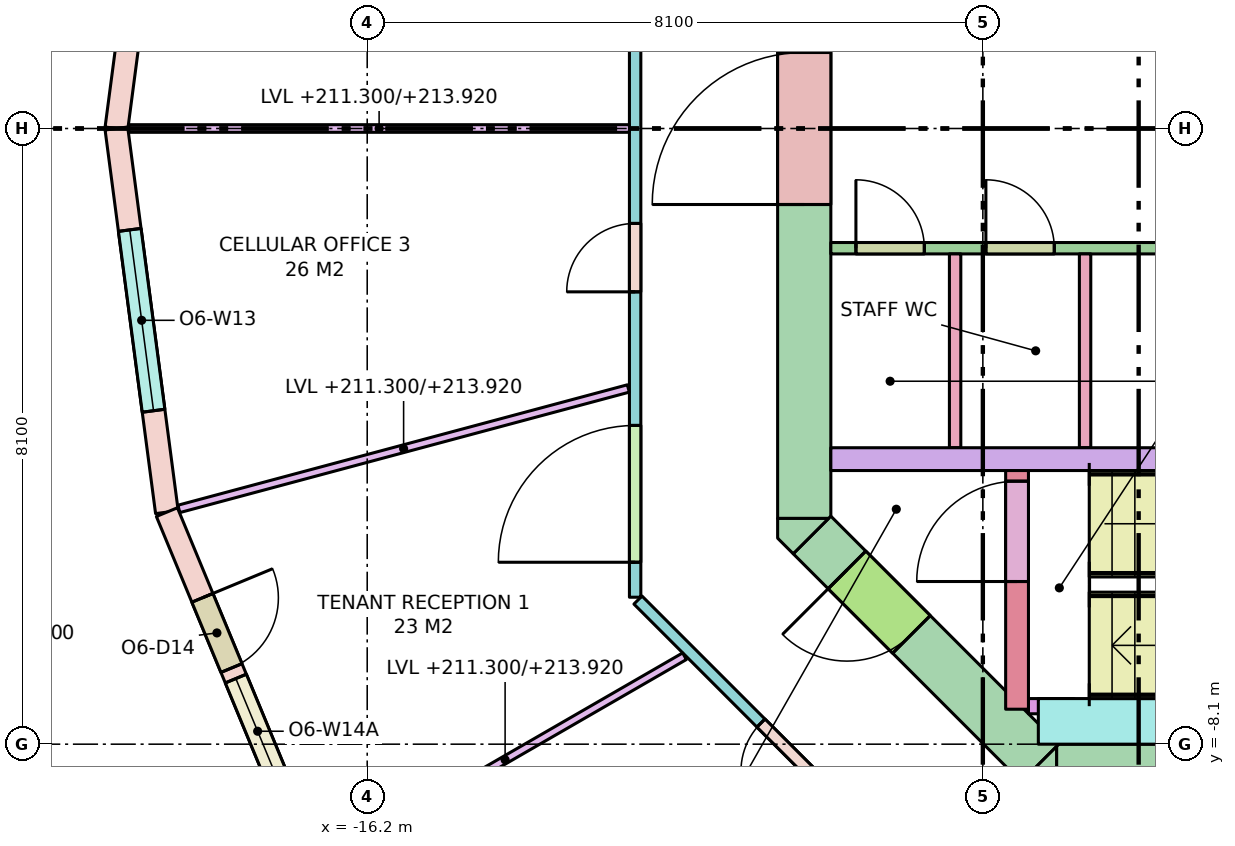
"""IFC4 building model, lengths in metres.
Left out: names, types, materials, properties, quantities, classifications, styles, units other than length and angle.
Written with IfcOpenShell. Run it as: python <this file> out.ifc"""

import sys

from ifc_helpers import new_model, si_unit, direction, frame, frame_2d, origin, place, context, subcontext, project, spatial, polyline, rectangle, outline, extrude, element, fill, save


model = new_model("IFC4")
c1 = context("Model", 3, precision=1e-05, world=origin(), true_north=direction((0.0, 1.0)))
c2 = subcontext(c1, "Body", "Model", "MODEL_VIEW")
j1 = project(units=[si_unit("LENGTHUNIT", "METRE"), si_unit("PLANEANGLEUNIT", "RADIAN")], contexts=[c1])
p1 = place(None, origin())
s1 = spatial("IfcSite", under=j1, at=p1, CompositionType="ELEMENT")
p2 = place(p1, origin())
s2 = spatial("IfcBuilding", under=s1, at=p2, CompositionType="ELEMENT")
p3 = place(p2, frame((0.0, 0.0, 211.3)))
s3 = spatial("IfcBuildingStorey", under=s2, at=p3, CompositionType="ELEMENT", Elevation=211.3)
p4 = place(p3, frame((-7.13, -8.45, -0.28), z_axis=(0.0, 0.0, 1.0), x_axis=(1.0, 0.0, 0.0)))
e1 = element("IfcWall", 1, at=p4, inside=s3, PredefinedType="SHEAR", context=c2, shape_type="SweptSolid", body=[
    extrude(rectangle(XDim=14.26, YDim=0.7, at=frame_2d((7.13, 0.0))), origin(), (0.0, 0.0, 1.0), 3.7),
])
p5 = place(p4, frame((8.08, 0.0, 0.28)))
e2 = element("IfcOpeningElement", 2, at=p5, cuts=e1, PredefinedType="OPENING", context=c2, shape_type="SweptSolid", body=[
    extrude(rectangle(XDim=0.7, YDim=2.1, at=frame_2d((0.35, 1.05))), frame((0.0, 0.36, 0.0), z_axis=(0.0, -1.0, 0.0), x_axis=(1.0, 0.0, 0.0)), (0.0, 0.0, 1.0), 0.72),
])
p6 = place(p4, frame((5.58, 0.0, 0.28)))
e3 = element("IfcOpeningElement", 3, at=p6, cuts=e1, PredefinedType="OPENING", context=c2, shape_type="SweptSolid", body=[
    extrude(rectangle(XDim=0.85, YDim=2.1, at=frame_2d((0.425, 1.05))), frame((0.0, 0.36, 0.0), z_axis=(0.0, -1.0, 0.0), x_axis=(1.0, 0.0, 0.0)), (0.0, 0.0, 1.0), 0.72),
])
p7 = place(p4, frame((6.88, 0.0, 0.28)))
e4 = element("IfcOpeningElement", 4, at=p7, cuts=e1, PredefinedType="OPENING", context=c2, shape_type="SweptSolid", body=[
    extrude(rectangle(XDim=0.85, YDim=2.1, at=frame_2d((0.425, 1.05))), frame((0.0, 0.36, 0.0), z_axis=(0.0, -1.0, 0.0), x_axis=(1.0, 0.0, 0.0)), (0.0, 0.0, 1.0), 0.72),
])
p8 = place(p4, frame((9.521, 0.0, 0.28)))
e5 = element("IfcOpeningElement", 5, at=p8, cuts=e1, PredefinedType="OPENING", context=c2, shape_type="SweptSolid", body=[
    extrude(rectangle(XDim=0.9, YDim=2.1, at=frame_2d((0.45, 1.05))), frame((0.0, 0.36, 0.0), z_axis=(0.0, -1.0, 0.0), x_axis=(1.0, 0.0, 0.0)), (0.0, 0.0, 1.0), 0.72),
])
p9 = place(p4, frame((11.278, 0.0, 0.28)))
e6 = element("IfcOpeningElement", 6, at=p9, cuts=e1, PredefinedType="OPENING", context=c2, shape_type="SweptSolid", body=[
    extrude(rectangle(XDim=0.9, YDim=2.1, at=frame_2d((0.45, 1.05))), frame((0.0, 0.36, 0.0), z_axis=(0.0, -1.0, 0.0), x_axis=(1.0, 0.0, 0.0)), (0.0, 0.0, 1.0), 0.72),
])
p10 = place(p4, frame((12.84, 0.0, 0.28)))
e7 = element("IfcOpeningElement", 7, at=p10, cuts=e1, PredefinedType="OPENING", context=c2, shape_type="SweptSolid", body=[
    extrude(rectangle(XDim=0.9, YDim=2.1, at=frame_2d((0.45, 1.05))), frame((0.0, 0.36, 0.0), z_axis=(0.0, -1.0, 0.0), x_axis=(1.0, 0.0, 0.0)), (0.0, 0.0, 1.0), 0.72),
])
p11 = place(p3, frame((-10.45, -5.13, -0.28), z_axis=(0.0, 0.0, 1.0), x_axis=(0.0, 1.0, 0.0)))
e8 = element("IfcWall", 8, at=p11, inside=s3, PredefinedType="SHEAR", context=c2, shape_type="SweptSolid", body=[
    extrude(rectangle(XDim=10.26, YDim=0.7, at=frame_2d((5.13, 0.0))), origin(), (0.0, 0.0, 1.0), 3.7),
])
p12 = place(p11, frame((4.13, 0.0, 0.28)))
e9 = element("IfcOpeningElement", 9, at=p12, cuts=e8, PredefinedType="OPENING", context=c2, shape_type="SweptSolid", body=[
    extrude(rectangle(XDim=2.0, YDim=2.1, at=frame_2d((1.0, 1.05))), frame((0.0, 0.36, 0.0), z_axis=(0.0, -1.0, 0.0), x_axis=(1.0, 0.0, 0.0)), (0.0, 0.0, 1.0), 0.72),
])
p13 = place(p3, frame((-7.347, -8.347, -0.28), z_axis=(0.0, 0.0, 1.0), x_axis=(-0.707106781187, 0.707106781187, 0.0)))
e10 = element("IfcWall", 10, at=p13, inside=s3, PredefinedType="SHEAR", context=c2, shape_type="SweptSolid", body=[
    extrude(rectangle(XDim=4.243, YDim=0.7, at=frame_2d((2.121, 0.0))), origin(), (0.0, 0.0, 1.0), 3.7),
])
p14 = place(p13, frame((2.393, 0.0, 0.28)))
e11 = element("IfcOpeningElement", 11, at=p14, cuts=e10, PredefinedType="OPENING", context=c2, shape_type="SweptSolid", body=[
    extrude(rectangle(XDim=1.2, YDim=2.1, at=frame_2d((0.6, 1.05))), frame((0.0, 0.36, 0.0), z_axis=(0.0, -1.0, 0.0), x_axis=(1.0, 0.0, 0.0)), (0.0, 0.0, 1.0), 0.72),
])
p15 = place(p3, frame((0.0, 0.0, -0.28)))
e12 = element("IfcWall", 12, at=p15, inside=s3, PredefinedType="SHEAR", context=c2, shape_type="SweptSolid", body=[
    extrude(outline(polyline([(-7.39, -8.8), (-7.595, -8.595), (-7.595, -8.595), (-7.595, -8.595), (-7.13, -8.13), (-7.13, -8.8), (-7.13, -8.8), (-7.39, -8.8)])), origin(), (0.0, 0.0, 1.0), 3.7),
])
p16 = place(p3, frame((0.0, 0.0, -0.28)))
e13 = element("IfcWall", 13, at=p16, inside=s3, PredefinedType="SHEAR", context=c2, shape_type="SweptSolid", body=[
    extrude(outline(polyline([(-10.8, -5.39), (-10.8, -5.13), (-10.8, -5.13), (-10.13, -5.13), (-10.595, -5.595), (-10.595, -5.595), (-10.595, -5.595), (-10.8, -5.39)])), origin(), (0.0, 0.0, 1.0), 3.7),
])
p17 = place(p3, frame((-10.1, -4.35, 0.0), z_axis=(0.0, 0.0, 1.0), x_axis=(1.0, 0.0, 0.0)))
e14 = element("IfcWall", 14, at=p17, inside=s3, PredefinedType="SOLIDWALL", context=c2, shape_type="SweptSolid", body=[
    extrude(rectangle(XDim=8.1, YDim=0.3, at=frame_2d((4.05, 0.0))), origin(), (0.0, 0.0, 1.0), 3.42),
])
p18 = place(p3, frame((-7.65, -7.64, 0.0), z_axis=(0.0, 0.0, 1.0), x_axis=(0.0, 1.0, 0.0)))
e15 = element("IfcWall", 15, at=p18, inside=s3, PredefinedType="SHEAR", context=c2, shape_type="SweptSolid", body=[
    extrude(rectangle(XDim=3.14, YDim=0.3, at=frame_2d((1.57, 0.0))), origin(), (0.0, 0.0, 1.0), 3.42),
])
p19 = place(p18, frame((1.68, 0.0, 0.0)))
e16 = element("IfcOpeningElement", 16, at=p19, cuts=e15, PredefinedType="OPENING", context=c2, shape_type="SweptSolid", body=[
    extrude(rectangle(XDim=1.32, YDim=2.1, at=frame_2d((0.66, 1.05))), frame((0.0, 0.16, 0.0), z_axis=(0.0, -1.0, 0.0), x_axis=(1.0, 0.0, 0.0)), (0.0, 0.0, 1.0), 0.32),
])
p20 = place(p3, frame((-7.5, -7.6, 0.0), z_axis=(0.0, 0.0, 1.0), x_axis=(1.0, 0.0, 0.0)))
e17 = element("IfcWall", 17, at=p20, inside=s3, PredefinedType="SHEAR", context=c2, shape_type="SweptSolid", body=[
    extrude(rectangle(XDim=0.6, YDim=0.2, at=frame_2d((0.3, 0.0))), origin(), (0.0, 0.0, 1.0), 3.42),
])
p21 = place(p3, frame((-7.37, -7.8, 0.0), z_axis=(0.0, 0.0, 1.0), x_axis=(1.0, 0.0, 0.0)))
e18 = element("IfcWall", 18, at=p21, inside=s3, PredefinedType="SHEAR", context=c2, shape_type="SweptSolid", body=[
    extrude(rectangle(XDim=5.37, YDim=0.6, at=frame_2d((2.685, 0.0))), origin(), (0.0, 0.0, 1.0), 3.42),
])
p22 = place(p3, frame((-18.836, 5.047, 0.0), z_axis=(0.0, 0.0, 1.0), x_axis=(-0.130495451964, -0.99144890792, 0.0)))
e19 = element("IfcWall", 19, at=p22, inside=s3, PredefinedType="STANDARD", context=c2, shape_type="SweptSolid", body=[
    extrude(rectangle(XDim=5.091, YDim=0.3, at=frame_2d((2.545, 0.0))), origin(), (0.0, 0.0, 1.0), 3.42),
])
p23 = place(p22, frame((1.22, 0.0, 0.0)))
e20 = element("IfcOpeningElement", 20, at=p23, cuts=e19, PredefinedType="OPENING", context=c2, shape_type="SweptSolid", body=[
    extrude(rectangle(XDim=1.0, YDim=2.4, at=frame_2d((0.5, 1.2))), frame((0.0, 0.16, 0.0), z_axis=(0.0, -1.0, 0.0), x_axis=(1.0, 0.0, 0.0)), (0.0, 0.0, 1.0), 0.32),
])
p24 = place(p22, frame((2.37, 0.0, 0.8)))
e21 = element("IfcOpeningElement", 21, at=p24, cuts=e19, PredefinedType="OPENING", context=c2, shape_type="SweptSolid", body=[
    extrude(rectangle(XDim=1.5, YDim=2.4, at=frame_2d((0.75, 1.2))), frame((0.0, 0.16, 0.0), z_axis=(0.0, -1.0, 0.0), x_axis=(1.0, 0.0, 0.0)), (0.0, 0.0, 1.0), 0.32),
])
p25 = place(p3, frame((-19.5, 0.0, 0.0), z_axis=(0.0, 0.0, 1.0), x_axis=(0.130495451964, -0.99144890792, 0.0)))
e22 = element("IfcWall", 22, at=p25, inside=s3, PredefinedType="STANDARD", context=c2, shape_type="SweptSolid", body=[
    extrude(rectangle(XDim=5.091, YDim=0.3, at=frame_2d((2.545, 0.0))), origin(), (0.0, 0.0, 1.0), 3.42),
])
p26 = place(p25, frame((1.345, 0.0, 0.8)))
e23 = element("IfcOpeningElement", 23, at=p26, cuts=e22, PredefinedType="OPENING", context=c2, shape_type="SweptSolid", body=[
    extrude(rectangle(XDim=2.4, YDim=2.4, at=frame_2d((1.2, 1.2))), frame((0.0, 0.16, 0.0), z_axis=(0.0, -1.0, 0.0), x_axis=(1.0, 0.0, 0.0)), (0.0, 0.0, 1.0), 0.32),
])
p27 = place(p3, frame((-18.836, -5.047, 0.0), z_axis=(0.0, 0.0, 1.0), x_axis=(0.382724538613, -0.923862504675, 0.0)))
e24 = element("IfcWall", 24, at=p27, inside=s3, PredefinedType="STANDARD", context=c2, shape_type="SweptSolid", body=[
    extrude(rectangle(XDim=5.091, YDim=0.3, at=frame_2d((2.545, 0.0))), origin(), (0.0, 0.0, 1.0), 3.42),
])
p28 = place(p27, frame((1.22, 0.0, 0.0)))
e25 = element("IfcOpeningElement", 25, at=p28, cuts=e24, PredefinedType="OPENING", context=c2, shape_type="SweptSolid", body=[
    extrude(rectangle(XDim=1.0, YDim=2.4, at=frame_2d((0.5, 1.2))), frame((0.0, 0.16, 0.0), z_axis=(0.0, -1.0, 0.0), x_axis=(1.0, 0.0, 0.0)), (0.0, 0.0, 1.0), 0.32),
])
p29 = place(p27, frame((2.37, 0.0, 0.8)))
e26 = element("IfcOpeningElement", 26, at=p29, cuts=e24, PredefinedType="OPENING", context=c2, shape_type="SweptSolid", body=[
    extrude(rectangle(XDim=1.5, YDim=2.4, at=frame_2d((0.75, 1.2))), frame((0.0, 0.16, 0.0), z_axis=(0.0, -1.0, 0.0), x_axis=(1.0, 0.0, 0.0)), (0.0, 0.0, 1.0), 0.32),
])
for number, where, z_axis, x_axis in (
    (27, (-8.465, -4.2, 0.0), (0.0, 0.0, 1.0), (0.0, 1.0, 0.0)),
    (28, (-6.755, -4.2, 0.0), (0.0, 0.0, 1.0), (0.0, 1.0, 0.0)),
):
    element("IfcWall", number, at=place(p3, frame(where, z_axis=z_axis, x_axis=x_axis)), inside=s3, PredefinedType="PARTITIONING", context=c2, shape_type="SweptSolid", body=[
        extrude(rectangle(XDim=2.55, YDim=0.15, at=frame_2d((1.275, 0.0))), origin(), (0.0, 0.0, 1.0), 3.42),
    ])
p30 = place(p3, frame((-10.1, -1.575, 0.0), z_axis=(0.0, 0.0, 1.0), x_axis=(1.0, 0.0, 0.0)))
e29 = element("IfcWall", 29, at=p30, inside=s3, PredefinedType="PARTITIONING", context=c2, shape_type="SweptSolid", body=[
    extrude(rectangle(XDim=8.1, YDim=0.15, at=frame_2d((4.05, 0.0))), origin(), (0.0, 0.0, 1.0), 3.42),
])
p31 = place(p30, frame((0.33, 0.0, 0.0)))
e30 = element("IfcOpeningElement", 30, at=p31, cuts=e29, PredefinedType="OPENING", context=c2, shape_type="SweptSolid", body=[
    extrude(rectangle(XDim=0.9, YDim=2.1, at=frame_2d((0.45, 1.05))), frame((0.0, 0.085, 0.0), z_axis=(0.0, -1.0, 0.0), x_axis=(1.0, 0.0, 0.0)), (0.0, 0.0, 1.0), 0.17),
])
p32 = place(p30, frame((2.04, 0.0, 0.0)))
e31 = element("IfcOpeningElement", 31, at=p32, cuts=e29, PredefinedType="OPENING", context=c2, shape_type="SweptSolid", body=[
    extrude(rectangle(XDim=0.9, YDim=2.1, at=frame_2d((0.45, 1.05))), frame((0.0, 0.085, 0.0), z_axis=(0.0, -1.0, 0.0), x_axis=(1.0, 0.0, 0.0)), (0.0, 0.0, 1.0), 0.17),
])
p33 = place(p30, frame((5.31, 0.0, 0.0)))
e32 = element("IfcOpeningElement", 32, at=p33, cuts=e29, PredefinedType="OPENING", context=c2, shape_type="SweptSolid", body=[
    extrude(rectangle(XDim=0.9, YDim=2.1, at=frame_2d((0.45, 1.05))), frame((0.0, 0.085, 0.0), z_axis=(0.0, -1.0, 0.0), x_axis=(1.0, 0.0, 0.0)), (0.0, 0.0, 1.0), 0.17),
])
p34 = place(p3, frame((-9.421, -9.421, 0.0), z_axis=(0.0, 0.0, 1.0), x_axis=(-0.707079950597, 0.707133610758, 0.0)))
e33 = element("IfcWall", 33, at=p34, inside=s3, PredefinedType="PARTITIONING", context=c2, shape_type="SweptSolid", body=[
    extrude(rectangle(XDim=4.55, YDim=0.15, at=frame_2d((2.275, 0.0))), origin(), (0.0, 0.0, 1.0), 2.62),
])
p35 = place(p34, frame((1.361, 0.0, 0.0)))
e34 = element("IfcOpeningElement", 34, at=p35, cuts=e33, PredefinedType="OPENING", context=c2, shape_type="SweptSolid", body=[
    extrude(rectangle(XDim=0.9, YDim=2.1, at=frame_2d((0.45, 1.05))), frame((0.0, 0.085, 0.0), z_axis=(0.0, -1.0, 0.0), x_axis=(1.0, 0.0, 0.0)), (0.0, 0.0, 1.0), 0.17),
])
p36 = place(p3, frame((-12.675, -6.167, 0.0), z_axis=(0.0, 0.0, 1.0), x_axis=(0.0, 1.0, 0.0)))
e35 = element("IfcWall", 35, at=p36, inside=s3, PredefinedType="PARTITIONING", context=c2, shape_type="SweptSolid", body=[
    extrude(rectangle(XDim=12.333, YDim=0.15, at=frame_2d((6.167, 0.0))), origin(), (0.0, 0.0, 1.0), 2.62),
])
p37 = place(p36, frame((10.473, 0.0, 0.0)))
e36 = element("IfcOpeningElement", 36, at=p37, cuts=e35, PredefinedType="OPENING", context=c2, shape_type="SweptSolid", body=[
    extrude(rectangle(XDim=0.9, YDim=2.1, at=frame_2d((0.45, 1.05))), frame((0.0, 0.085, 0.0), z_axis=(0.0, -1.0, 0.0), x_axis=(1.0, 0.0, 0.0)), (0.0, 0.0, 1.0), 0.17),
])
p38 = place(p36, frame((7.416, 0.0, 0.0)))
e37 = element("IfcOpeningElement", 37, at=p38, cuts=e35, PredefinedType="OPENING", context=c2, shape_type="SweptSolid", body=[
    extrude(rectangle(XDim=0.9, YDim=2.1, at=frame_2d((0.45, 1.05))), frame((0.0, 0.085, 0.0), z_axis=(0.0, -1.0, 0.0), x_axis=(1.0, 0.0, 0.0)), (0.0, 0.0, 1.0), 0.17),
])
p39 = place(p36, frame((4.018, 0.0, 0.0)))
e38 = element("IfcOpeningElement", 38, at=p39, cuts=e35, PredefinedType="OPENING", context=c2, shape_type="SweptSolid", body=[
    extrude(rectangle(XDim=0.9, YDim=2.1, at=frame_2d((0.45, 1.05))), frame((0.0, 0.085, 0.0), z_axis=(0.0, -1.0, 0.0), x_axis=(1.0, 0.0, 0.0)), (0.0, 0.0, 1.0), 0.17),
])
p40 = place(p36, frame((0.46, 0.0, 0.0)))
e39 = element("IfcOpeningElement", 39, at=p40, cuts=e35, PredefinedType="OPENING", context=c2, shape_type="SweptSolid", body=[
    extrude(rectangle(XDim=1.8, YDim=2.1, at=frame_2d((0.9, 1.05))), frame((0.0, 0.085, 0.0), z_axis=(0.0, -1.0, 0.0), x_axis=(1.0, 0.0, 0.0)), (0.0, 0.0, 1.0), 0.17),
])
p41 = place(p3, frame((-12.75, 0.0, 0.0), z_axis=(0.0, 0.0, 1.0), x_axis=(-1.0, 0.0, 0.0)))
e40 = element("IfcWall", 40, at=p41, inside=s3, PredefinedType="PARTITIONING", context=c2, shape_type="SweptSolid", body=[
    extrude(rectangle(XDim=6.587, YDim=0.1, at=frame_2d((3.293, 0.0))), origin(), (0.0, 0.0, 1.0), 2.62),
])
p42 = place(p3, frame((-12.764, -3.42, 0.0), z_axis=(0.0, 0.0, 1.0), x_axis=(-0.965925800266, -0.258819142221, 0.0)))
e41 = element("IfcWall", 41, at=p42, inside=s3, PredefinedType="PARTITIONING", context=c2, shape_type="SweptSolid", body=[
    extrude(rectangle(XDim=6.122, YDim=0.1, at=frame_2d((3.061, 0.0))), origin(), (0.0, 0.0, 1.0), 2.62),
])
p43 = place(p3, frame((-12.025, -6.943, 0.0), z_axis=(0.0, 0.0, 1.0), x_axis=(-0.866029712004, -0.499992537871, 0.0)))
e42 = element("IfcWall", 42, at=p43, inside=s3, PredefinedType="PARTITIONING", context=c2, shape_type="SweptSolid", body=[
    extrude(rectangle(XDim=5.451, YDim=0.1, at=frame_2d((2.726, 0.0))), origin(), (0.0, 0.0, 1.0), 2.62),
])
p44 = place(p26, origin())
e43 = element("IfcWindow", 43, at=p44, inside=s3, PartitioningType="SINGLE_PANEL", PredefinedType="WINDOW", context=c2, shape_type="SweptSolid", body=[
    extrude(rectangle(XDim=2.4, YDim=2.4, at=frame_2d((1.2, 1.2))), frame((0.0, 0.03, 0.0), z_axis=(0.0, -1.0, 0.0), x_axis=(1.0, 0.0, 0.0)), (0.0, 0.0, 1.0), 0.06),
])
fill(e23, e43)
p45 = place(p28, origin())
e44 = element("IfcDoor", 44, at=p45, inside=s3, OperationType="SINGLE_SWING_LEFT", PredefinedType="DOOR", context=c2, shape_type="SweptSolid", body=[
    extrude(rectangle(XDim=1.0, YDim=2.4, at=frame_2d((0.5, 1.2))), frame((0.0, 0.025, 0.0), z_axis=(0.0, -1.0, 0.0), x_axis=(1.0, 0.0, 0.0)), (0.0, 0.0, 1.0), 0.05),
])
fill(e25, e44)
p46 = place(p29, origin())
e45 = element("IfcWindow", 45, at=p46, inside=s3, PartitioningType="SINGLE_PANEL", PredefinedType="WINDOW", context=c2, shape_type="SweptSolid", body=[
    extrude(rectangle(XDim=1.5, YDim=2.4, at=frame_2d((0.75, 1.2))), frame((0.0, 0.03, 0.0), z_axis=(0.0, -1.0, 0.0), x_axis=(1.0, 0.0, 0.0)), (0.0, 0.0, 1.0), 0.06),
])
fill(e26, e45)
p47 = place(p19, origin())
e46 = element("IfcDoor", 46, at=p47, inside=s3, OperationType="DOUBLE_DOOR_SINGLE_SWING", PredefinedType="DOOR", context=c2, shape_type="SweptSolid", body=[
    extrude(rectangle(XDim=1.32, YDim=2.1, at=frame_2d((0.66, 1.05))), frame((0.0, 0.025, 0.0), z_axis=(0.0, -1.0, 0.0), x_axis=(1.0, 0.0, 0.0)), (0.0, 0.0, 1.0), 0.05),
])
fill(e16, e46)
p48 = place(p14, origin())
e47 = element("IfcDoor", 47, at=p48, inside=s3, OperationType="SINGLE_SWING_RIGHT", PredefinedType="DOOR", context=c2, shape_type="SweptSolid", body=[
    extrude(rectangle(XDim=1.2, YDim=2.1, at=frame_2d((0.6, 1.05))), frame((0.0, 0.025, 0.0), z_axis=(0.0, -1.0, 0.0), x_axis=(1.0, 0.0, 0.0)), (0.0, 0.0, 1.0), 0.05),
])
fill(e11, e47)
p49 = place(p12, origin())
e48 = element("IfcDoor", 48, at=p49, inside=s3, OperationType="DOUBLE_DOOR_SINGLE_SWING", PredefinedType="DOOR", context=c2, shape_type="SweptSolid", body=[
    extrude(rectangle(XDim=2.0, YDim=2.1, at=frame_2d((1.0, 1.05))), frame((0.0, 0.025, 0.0), z_axis=(0.0, -1.0, 0.0), x_axis=(1.0, 0.0, 0.0)), (0.0, 0.0, 1.0), 0.05),
])
fill(e9, e48)
p50 = place(p31, origin())
e49 = element("IfcDoor", 49, at=p50, inside=s3, OperationType="SINGLE_SWING_LEFT", PredefinedType="DOOR", context=c2, shape_type="SweptSolid", body=[
    extrude(rectangle(XDim=0.9, YDim=2.1, at=frame_2d((0.45, 1.05))), frame((0.0, 0.025, 0.0), z_axis=(0.0, -1.0, 0.0), x_axis=(1.0, 0.0, 0.0)), (0.0, 0.0, 1.0), 0.05),
])
fill(e30, e49)
p51 = place(p32, origin())
e50 = element("IfcDoor", 50, at=p51, inside=s3, OperationType="SINGLE_SWING_LEFT", PredefinedType="DOOR", context=c2, shape_type="SweptSolid", body=[
    extrude(rectangle(XDim=0.9, YDim=2.1, at=frame_2d((0.45, 1.05))), frame((0.0, 0.025, 0.0), z_axis=(0.0, -1.0, 0.0), x_axis=(1.0, 0.0, 0.0)), (0.0, 0.0, 1.0), 0.05),
])
fill(e31, e50)
p52 = place(p39, origin())
e51 = element("IfcDoor", 51, at=p52, inside=s3, OperationType="SINGLE_SWING_LEFT", PredefinedType="DOOR", context=c2, shape_type="SweptSolid", body=[
    extrude(rectangle(XDim=0.9, YDim=2.1, at=frame_2d((0.45, 1.05))), frame((0.0, 0.025, 0.0), z_axis=(0.0, -1.0, 0.0), x_axis=(1.0, 0.0, 0.0)), (0.0, 0.0, 1.0), 0.05),
])
fill(e38, e51)
p53 = place(p40, origin())
e52 = element("IfcDoor", 52, at=p53, inside=s3, OperationType="DOUBLE_DOOR_SINGLE_SWING", PredefinedType="DOOR", context=c2, shape_type="SweptSolid", body=[
    extrude(rectangle(XDim=1.8, YDim=2.1, at=frame_2d((0.9, 1.05))), frame((0.0, 0.025, 0.0), z_axis=(0.0, -1.0, 0.0), x_axis=(1.0, 0.0, 0.0)), (0.0, 0.0, 1.0), 0.05),
])
fill(e39, e52)
p54 = place(p35, origin())
e53 = element("IfcDoor", 53, at=p54, inside=s3, OperationType="SINGLE_SWING_LEFT", PredefinedType="DOOR", context=c2, shape_type="SweptSolid", body=[
    extrude(rectangle(XDim=0.9, YDim=2.1, at=frame_2d((0.45, 1.05))), frame((0.0, 0.025, 0.0), z_axis=(0.0, -1.0, 0.0), x_axis=(1.0, 0.0, 0.0)), (0.0, 0.0, 1.0), 0.05),
])
fill(e34, e53)
save(model, sys.argv[1])
